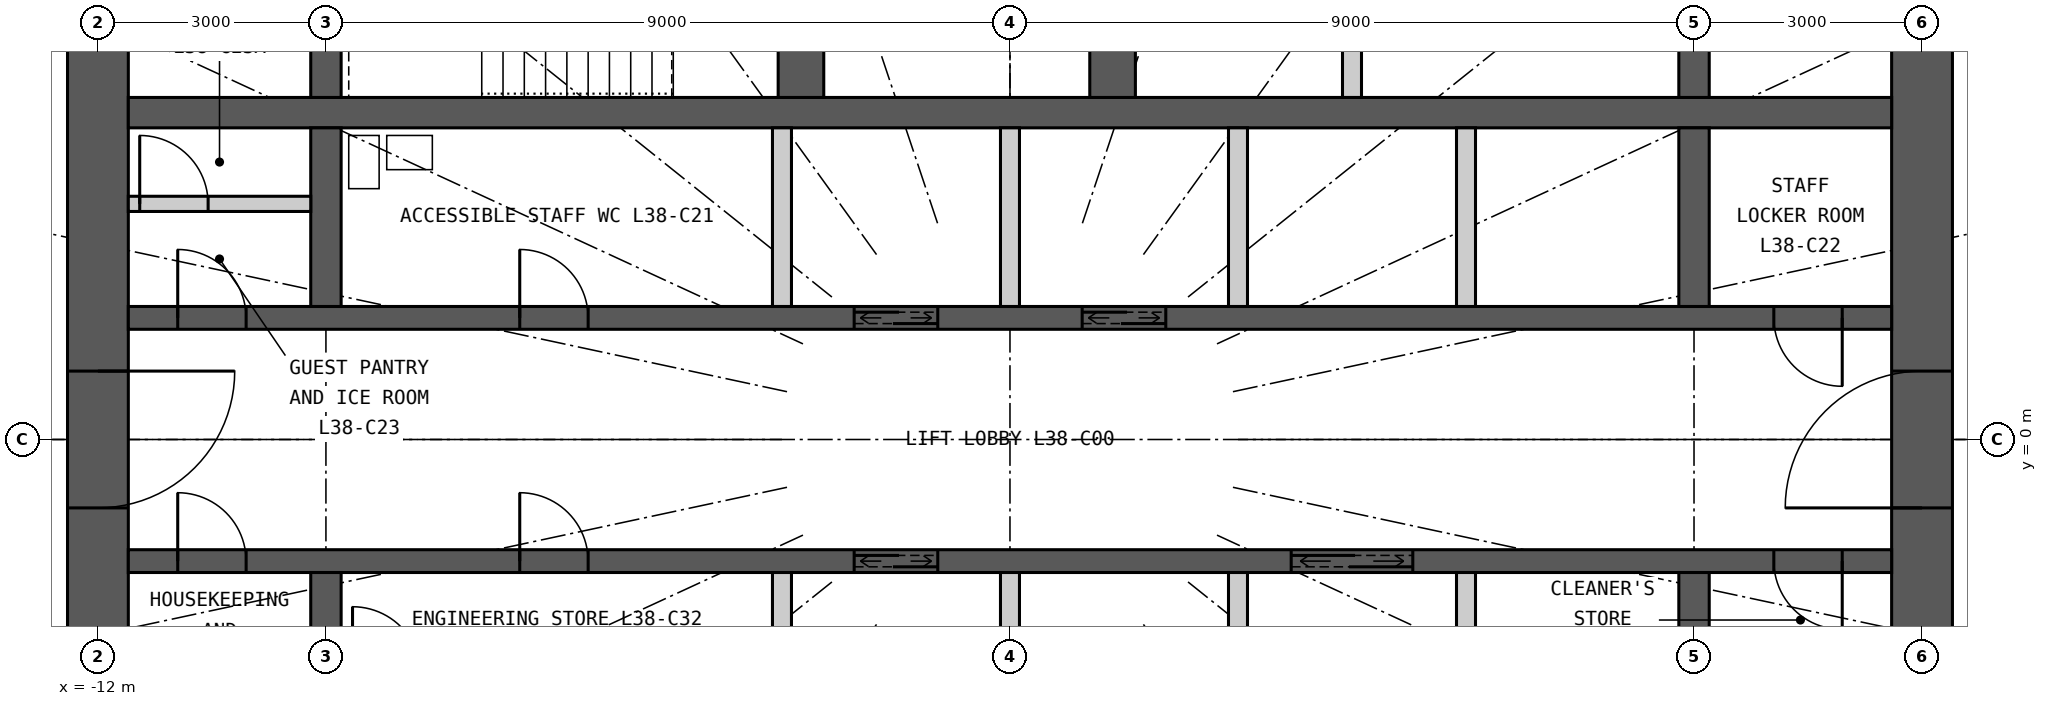
"""IFC4 building model, lengths in metres.
Left out: names, types, materials, properties, quantities, classifications, styles, units other than length and angle.
Written with IfcOpenShell. Run it as: python <this file> out.ifc"""

import sys

from ifc_helpers import new_model, si_unit, direction, frame, frame_2d, origin, place, context, subcontext, project, spatial, rectangle, extrude, element, fill, save


model = new_model("IFC4")
c1 = context("Model", 3, precision=1e-05, world=origin(), true_north=direction((0.0, 1.0)))
c2 = subcontext(c1, "Body", "Model", "MODEL_VIEW")
j1 = project(units=[si_unit("LENGTHUNIT", "METRE"), si_unit("PLANEANGLEUNIT", "RADIAN")], contexts=[c1])
p1 = place(None, origin())
s1 = spatial("IfcSite", under=j1, at=p1, CompositionType="ELEMENT")
p2 = place(p1, origin())
s2 = spatial("IfcBuilding", under=s1, at=p2, CompositionType="ELEMENT")
p3 = place(p2, frame((0.0, 0.0, 146.7)))
s3 = spatial("IfcBuildingStorey", under=s2, at=p3, CompositionType="ELEMENT", Elevation=146.7)
p4 = place(p3, frame((12.0, -7.6, 0.0), z_axis=(0.0, 0.0, 1.0), x_axis=(0.0, 1.0, 0.0)))
e1 = element("IfcWall", 1, at=p4, inside=s3, PredefinedType="SHEAR", context=c2, shape_type="SweptSolid", body=[
    extrude(rectangle(XDim=15.2, YDim=0.8, at=frame_2d((7.6, 0.0))), origin(), (0.0, 0.0, 1.0), 3.3),
])
p5 = place(p4, frame((6.7, 0.0, 0.0)))
e2 = element("IfcOpeningElement", 2, at=p5, cuts=e1, PredefinedType="OPENING", context=c2, shape_type="SweptSolid", body=[
    extrude(rectangle(XDim=1.8, YDim=2.2, at=frame_2d((0.9, 1.1))), frame((0.0, 0.41, 0.0), z_axis=(0.0, -1.0, 0.0), x_axis=(1.0, 0.0, 0.0)), (0.0, 0.0, 1.0), 0.82),
])
p6 = place(p3, frame((-12.0, 7.6, 0.0), z_axis=(0.0, 0.0, 1.0), x_axis=(0.0, -1.0, 0.0)))
e3 = element("IfcWall", 3, at=p6, inside=s3, PredefinedType="SHEAR", context=c2, shape_type="SweptSolid", body=[
    extrude(rectangle(XDim=15.2, YDim=0.8, at=frame_2d((7.6, 0.0))), origin(), (0.0, 0.0, 1.0), 3.3),
])
p7 = place(p6, frame((6.7, 0.0, 0.0)))
e4 = element("IfcOpeningElement", 4, at=p7, cuts=e3, PredefinedType="OPENING", context=c2, shape_type="SweptSolid", body=[
    extrude(rectangle(XDim=1.8, YDim=2.2, at=frame_2d((0.9, 1.1))), frame((0.0, 0.41, 0.0), z_axis=(0.0, -1.0, 0.0), x_axis=(1.0, 0.0, 0.0)), (0.0, 0.0, 1.0), 0.82),
])
p8 = place(p3, frame((-11.6, 4.3, 0.0), z_axis=(0.0, 0.0, 1.0), x_axis=(1.0, 0.0, 0.0)))
e5 = element("IfcWall", 5, at=p8, inside=s3, PredefinedType="SHEAR", context=c2, shape_type="SweptSolid", body=[
    extrude(rectangle(XDim=23.2, YDim=0.4, at=frame_2d((11.6, 0.0))), origin(), (0.0, 0.0, 1.0), 3.3),
])
p9 = place(p3, frame((-11.6, 1.6, 0.0), z_axis=(0.0, 0.0, 1.0), x_axis=(1.0, 0.0, 0.0)))
e6 = element("IfcWall", 6, at=p9, inside=s3, PredefinedType="SHEAR", context=c2, shape_type="SweptSolid", body=[
    extrude(rectangle(XDim=23.2, YDim=0.3, at=frame_2d((11.6, 0.0))), origin(), (0.0, 0.0, 1.0), 3.3),
])
p10 = place(p9, frame((9.55, 0.0, 0.0)))
e7 = element("IfcOpeningElement", 7, at=p10, cuts=e6, PredefinedType="OPENING", context=c2, shape_type="SweptSolid", body=[
    extrude(rectangle(XDim=1.1, YDim=2.2, at=frame_2d((0.55, 1.1))), frame((0.0, 0.16, 0.0), z_axis=(0.0, -1.0, 0.0), x_axis=(1.0, 0.0, 0.0)), (0.0, 0.0, 1.0), 0.32),
])
p11 = place(p9, frame((12.55, 0.0, 0.0)))
e8 = element("IfcOpeningElement", 8, at=p11, cuts=e6, PredefinedType="OPENING", context=c2, shape_type="SweptSolid", body=[
    extrude(rectangle(XDim=1.1, YDim=2.2, at=frame_2d((0.55, 1.1))), frame((0.0, 0.16, 0.0), z_axis=(0.0, -1.0, 0.0), x_axis=(1.0, 0.0, 0.0)), (0.0, 0.0, 1.0), 0.32),
])
p12 = place(p9, frame((5.15, 0.0, 0.0)))
e9 = element("IfcOpeningElement", 9, at=p12, cuts=e6, PredefinedType="OPENING", context=c2, shape_type="SweptSolid", body=[
    extrude(rectangle(XDim=0.9, YDim=2.2, at=frame_2d((0.45, 1.1))), frame((0.0, 0.16, 0.0), z_axis=(0.0, -1.0, 0.0), x_axis=(1.0, 0.0, 0.0)), (0.0, 0.0, 1.0), 0.32),
])
p13 = place(p9, frame((21.65, 0.0, 0.0)))
e10 = element("IfcOpeningElement", 10, at=p13, cuts=e6, PredefinedType="OPENING", context=c2, shape_type="SweptSolid", body=[
    extrude(rectangle(XDim=0.9, YDim=2.2, at=frame_2d((0.45, 1.1))), frame((0.0, 0.16, 0.0), z_axis=(0.0, -1.0, 0.0), x_axis=(1.0, 0.0, 0.0)), (0.0, 0.0, 1.0), 0.32),
])
p14 = place(p9, frame((0.65, 0.0, 0.0)))
e11 = element("IfcOpeningElement", 11, at=p14, cuts=e6, PredefinedType="OPENING", context=c2, shape_type="SweptSolid", body=[
    extrude(rectangle(XDim=0.9, YDim=2.2, at=frame_2d((0.45, 1.1))), frame((0.0, 0.16, 0.0), z_axis=(0.0, -1.0, 0.0), x_axis=(1.0, 0.0, 0.0)), (0.0, 0.0, 1.0), 0.32),
])
p15 = place(p3, frame((-11.6, -1.6, 0.0), z_axis=(0.0, 0.0, 1.0), x_axis=(1.0, 0.0, 0.0)))
e12 = element("IfcWall", 12, at=p15, inside=s3, PredefinedType="SHEAR", context=c2, shape_type="SweptSolid", body=[
    extrude(rectangle(XDim=23.2, YDim=0.3, at=frame_2d((11.6, 0.0))), origin(), (0.0, 0.0, 1.0), 3.3),
])
p16 = place(p15, frame((9.55, 0.0, 0.0)))
e13 = element("IfcOpeningElement", 13, at=p16, cuts=e12, PredefinedType="OPENING", context=c2, shape_type="SweptSolid", body=[
    extrude(rectangle(XDim=1.1, YDim=2.2, at=frame_2d((0.55, 1.1))), frame((0.0, 0.16, 0.0), z_axis=(0.0, -1.0, 0.0), x_axis=(1.0, 0.0, 0.0)), (0.0, 0.0, 1.0), 0.32),
])
p17 = place(p15, frame((15.3, 0.0, 0.0)))
e14 = element("IfcOpeningElement", 14, at=p17, cuts=e12, PredefinedType="OPENING", context=c2, shape_type="SweptSolid", body=[
    extrude(rectangle(XDim=1.6, YDim=2.4, at=frame_2d((0.8, 1.2))), frame((0.0, 0.16, 0.0), z_axis=(0.0, -1.0, 0.0), x_axis=(1.0, 0.0, 0.0)), (0.0, 0.0, 1.0), 0.32),
])
p18 = place(p15, frame((0.65, 0.0, 0.0)))
e15 = element("IfcOpeningElement", 15, at=p18, cuts=e12, PredefinedType="OPENING", context=c2, shape_type="SweptSolid", body=[
    extrude(rectangle(XDim=0.9, YDim=2.2, at=frame_2d((0.45, 1.1))), frame((0.0, 0.16, 0.0), z_axis=(0.0, -1.0, 0.0), x_axis=(1.0, 0.0, 0.0)), (0.0, 0.0, 1.0), 0.32),
])
p19 = place(p15, frame((5.15, 0.0, 0.0)))
e16 = element("IfcOpeningElement", 16, at=p19, cuts=e12, PredefinedType="OPENING", context=c2, shape_type="SweptSolid", body=[
    extrude(rectangle(XDim=0.9, YDim=2.2, at=frame_2d((0.45, 1.1))), frame((0.0, 0.16, 0.0), z_axis=(0.0, -1.0, 0.0), x_axis=(1.0, 0.0, 0.0)), (0.0, 0.0, 1.0), 0.32),
])
p20 = place(p15, frame((21.65, 0.0, 0.0)))
e17 = element("IfcOpeningElement", 17, at=p20, cuts=e12, PredefinedType="OPENING", context=c2, shape_type="SweptSolid", body=[
    extrude(rectangle(XDim=0.9, YDim=2.2, at=frame_2d((0.45, 1.1))), frame((0.0, 0.16, 0.0), z_axis=(0.0, -1.0, 0.0), x_axis=(1.0, 0.0, 0.0)), (0.0, 0.0, 1.0), 0.32),
])
p21 = place(p3, frame((-9.0, 4.5, 0.0), z_axis=(0.0, 0.0, 1.0), x_axis=(0.0, 1.0, 0.0)))
e18 = element("IfcWall", 18, at=p21, inside=s3, PredefinedType="SHEAR", context=c2, shape_type="SweptSolid", body=[
    extrude(rectangle(XDim=3.1, YDim=0.4, at=frame_2d((1.55, 0.0))), origin(), (0.0, 0.0, 1.0), 3.3),
])
for number, where, z_axis, x_axis in (
    (19, (-9.0, 1.75, 0.0), (0.0, 0.0, 1.0), (0.0, 1.0, 0.0)),
    (20, (-9.0, -4.1, 0.0), (0.0, 0.0, 1.0), (0.0, 1.0, 0.0)),
):
    element("IfcWall", number, at=place(p3, frame(where, z_axis=z_axis, x_axis=x_axis)), inside=s3, PredefinedType="SHEAR", context=c2, shape_type="SweptSolid", body=[
        extrude(rectangle(XDim=2.35, YDim=0.4, at=frame_2d((1.175, 0.0))), origin(), (0.0, 0.0, 1.0), 3.3),
    ])
p22 = place(p3, frame((9.0, 4.5, 0.0), z_axis=(0.0, 0.0, 1.0), x_axis=(0.0, 1.0, 0.0)))
e21 = element("IfcWall", 21, at=p22, inside=s3, PredefinedType="SHEAR", context=c2, shape_type="SweptSolid", body=[
    extrude(rectangle(XDim=3.1, YDim=0.4, at=frame_2d((1.55, 0.0))), origin(), (0.0, 0.0, 1.0), 3.3),
])
for number, where, z_axis, x_axis in (
    (22, (9.0, 1.75, 0.0), (0.0, 0.0, 1.0), (0.0, 1.0, 0.0)),
    (23, (9.0, -4.1, 0.0), (0.0, 0.0, 1.0), (0.0, 1.0, 0.0)),
):
    element("IfcWall", number, at=place(p3, frame(where, z_axis=z_axis, x_axis=x_axis)), inside=s3, PredefinedType="SHEAR", context=c2, shape_type="SweptSolid", body=[
        extrude(rectangle(XDim=2.35, YDim=0.4, at=frame_2d((1.175, 0.0))), origin(), (0.0, 0.0, 1.0), 3.3),
    ])
p23 = place(p3, frame((-2.75, 4.5, 0.0), z_axis=(0.0, 0.0, 1.0), x_axis=(0.0, 1.0, 0.0)))
e24 = element("IfcWall", 24, at=p23, inside=s3, PredefinedType="SHEAR", context=c2, shape_type="SweptSolid", body=[
    extrude(rectangle(XDim=3.1, YDim=0.6, at=frame_2d((1.55, 0.0))), origin(), (0.0, 0.0, 1.0), 3.3),
])
p24 = place(p23, frame((0.925, 0.0, 0.0)))
e25 = element("IfcOpeningElement", 25, at=p24, cuts=e24, PredefinedType="OPENING", context=c2, shape_type="SweptSolid", body=[
    extrude(rectangle(XDim=1.1, YDim=2.2, at=frame_2d((0.55, 1.1))), frame((0.0, 0.31, 0.0), z_axis=(0.0, -1.0, 0.0), x_axis=(1.0, 0.0, 0.0)), (0.0, 0.0, 1.0), 0.62),
])
p25 = place(p3, frame((1.35, 4.5, 0.0), z_axis=(0.0, 0.0, 1.0), x_axis=(0.0, 1.0, 0.0)))
e26 = element("IfcWall", 26, at=p25, inside=s3, PredefinedType="SHEAR", context=c2, shape_type="SweptSolid", body=[
    extrude(rectangle(XDim=3.1, YDim=0.6, at=frame_2d((1.55, 0.0))), origin(), (0.0, 0.0, 1.0), 3.3),
])
p26 = place(p25, frame((1.0, 0.0, 0.0)))
e27 = element("IfcOpeningElement", 27, at=p26, cuts=e26, PredefinedType="OPENING", context=c2, shape_type="SweptSolid", body=[
    extrude(rectangle(XDim=1.1, YDim=2.2, at=frame_2d((0.55, 1.1))), frame((0.0, 0.31, 0.0), z_axis=(0.0, -1.0, 0.0), x_axis=(1.0, 0.0, 0.0)), (0.0, 0.0, 1.0), 0.62),
])
p27 = place(p3, frame((4.5, 4.5, 0.0), z_axis=(0.0, 0.0, 1.0), x_axis=(0.0, 1.0, 0.0)))
e28 = element("IfcWall", 28, at=p27, inside=s3, PredefinedType="PARTITIONING", context=c2, shape_type="SweptSolid", body=[
    extrude(rectangle(XDim=3.1, YDim=0.25, at=frame_2d((1.55, 0.0))), origin(), (0.0, 0.0, 1.0), 3.3),
])
for number, where, z_axis, x_axis in (
    (29, (-3.0, 1.75, 0.0), (0.0, 0.0, 1.0), (0.0, 1.0, 0.0)),
    (30, (0.0, 1.75, 0.0), (0.0, 0.0, 1.0), (0.0, 1.0, 0.0)),
    (31, (3.0, 1.75, 0.0), (0.0, 0.0, 1.0), (0.0, 1.0, 0.0)),
    (32, (6.0, 1.75, 0.0), (0.0, 0.0, 1.0), (0.0, 1.0, 0.0)),
    (33, (-3.0, -4.1, 0.0), (0.0, 0.0, 1.0), (0.0, 1.0, 0.0)),
    (34, (0.0, -4.1, 0.0), (0.0, 0.0, 1.0), (0.0, 1.0, 0.0)),
    (35, (3.0, -4.1, 0.0), (0.0, 0.0, 1.0), (0.0, 1.0, 0.0)),
    (36, (6.0, -4.1, 0.0), (0.0, 0.0, 1.0), (0.0, 1.0, 0.0)),
):
    element("IfcWall", number, at=place(p3, frame(where, z_axis=z_axis, x_axis=x_axis)), inside=s3, PredefinedType="PARTITIONING", context=c2, shape_type="SweptSolid", body=[
        extrude(rectangle(XDim=2.35, YDim=0.25, at=frame_2d((1.175, 0.0))), origin(), (0.0, 0.0, 1.0), 3.3),
    ])
p28 = place(p3, frame((-11.6, 3.1, 0.0), z_axis=(0.0, 0.0, 1.0), x_axis=(1.0, 0.0, 0.0)))
e37 = element("IfcWall", 37, at=p28, inside=s3, PredefinedType="PARTITIONING", context=c2, shape_type="SweptSolid", body=[
    extrude(rectangle(XDim=2.4, YDim=0.2, at=frame_2d((1.2, 0.0))), origin(), (0.0, 0.0, 1.0), 3.12),
])
p29 = place(p28, frame((0.15, 0.0, 0.0)))
e38 = element("IfcOpeningElement", 38, at=p29, cuts=e37, PredefinedType="OPENING", context=c2, shape_type="SweptSolid", body=[
    extrude(rectangle(XDim=0.9, YDim=2.2, at=frame_2d((0.45, 1.1))), frame((0.0, 0.11, 0.0), z_axis=(0.0, -1.0, 0.0), x_axis=(1.0, 0.0, 0.0)), (0.0, 0.0, 1.0), 0.22),
])
p30 = place(p10, origin())
e39 = element("IfcDoor", 39, at=p30, inside=s3, OperationType="DOUBLE_DOOR_SLIDING", PredefinedType="DOOR", context=c2, shape_type="SweptSolid", body=[
    extrude(rectangle(XDim=1.1, YDim=2.2, at=frame_2d((0.55, 1.1))), frame((0.0, 0.025, 0.0), z_axis=(0.0, -1.0, 0.0), x_axis=(1.0, 0.0, 0.0)), (0.0, 0.0, 1.0), 0.05),
])
fill(e7, e39)
p31 = place(p11, origin())
e40 = element("IfcDoor", 40, at=p31, inside=s3, OperationType="DOUBLE_DOOR_SLIDING", PredefinedType="DOOR", context=c2, shape_type="SweptSolid", body=[
    extrude(rectangle(XDim=1.1, YDim=2.2, at=frame_2d((0.55, 1.1))), frame((0.0, 0.025, 0.0), z_axis=(0.0, -1.0, 0.0), x_axis=(1.0, 0.0, 0.0)), (0.0, 0.0, 1.0), 0.05),
])
fill(e8, e40)
p32 = place(p16, origin())
e41 = element("IfcDoor", 41, at=p32, inside=s3, OperationType="DOUBLE_DOOR_SLIDING", PredefinedType="DOOR", context=c2, shape_type="SweptSolid", body=[
    extrude(rectangle(XDim=1.1, YDim=2.2, at=frame_2d((0.55, 1.1))), frame((0.0, 0.025, 0.0), z_axis=(0.0, -1.0, 0.0), x_axis=(1.0, 0.0, 0.0)), (0.0, 0.0, 1.0), 0.05),
])
fill(e13, e41)
p33 = place(p17, origin())
e42 = element("IfcDoor", 42, at=p33, inside=s3, OperationType="DOUBLE_DOOR_SLIDING", PredefinedType="DOOR", context=c2, shape_type="SweptSolid", body=[
    extrude(rectangle(XDim=1.6, YDim=2.4, at=frame_2d((0.8, 1.2))), frame((0.0, 0.025, 0.0), z_axis=(0.0, -1.0, 0.0), x_axis=(1.0, 0.0, 0.0)), (0.0, 0.0, 1.0), 0.05),
])
fill(e14, e42)
p34 = place(p12, origin())
e43 = element("IfcDoor", 43, at=p34, inside=s3, OperationType="SINGLE_SWING_LEFT", PredefinedType="DOOR", context=c2, shape_type="SweptSolid", body=[
    extrude(rectangle(XDim=0.9, YDim=2.2, at=frame_2d((0.45, 1.1))), frame((0.0, 0.025, 0.0), z_axis=(0.0, -1.0, 0.0), x_axis=(1.0, 0.0, 0.0)), (0.0, 0.0, 1.0), 0.05),
])
fill(e9, e43)
p35 = place(p13, origin())
e44 = element("IfcDoor", 44, at=p35, inside=s3, OperationType="SINGLE_SWING_RIGHT", PredefinedType="DOOR", context=c2, shape_type="SweptSolid", body=[
    extrude(rectangle(XDim=0.9, YDim=2.2, at=frame_2d((0.45, 1.1))), frame((0.0, 0.025, 0.0), z_axis=(0.0, -1.0, 0.0), x_axis=(1.0, 0.0, 0.0)), (0.0, 0.0, 1.0), 0.05),
])
fill(e10, e44)
p36 = place(p18, origin())
e45 = element("IfcDoor", 45, at=p36, inside=s3, OperationType="SINGLE_SWING_LEFT", PredefinedType="DOOR", context=c2, shape_type="SweptSolid", body=[
    extrude(rectangle(XDim=0.9, YDim=2.2, at=frame_2d((0.45, 1.1))), frame((0.0, 0.025, 0.0), z_axis=(0.0, -1.0, 0.0), x_axis=(1.0, 0.0, 0.0)), (0.0, 0.0, 1.0), 0.05),
])
fill(e15, e45)
p37 = place(p19, origin())
e46 = element("IfcDoor", 46, at=p37, inside=s3, OperationType="SINGLE_SWING_LEFT", PredefinedType="DOOR", context=c2, shape_type="SweptSolid", body=[
    extrude(rectangle(XDim=0.9, YDim=2.2, at=frame_2d((0.45, 1.1))), frame((0.0, 0.025, 0.0), z_axis=(0.0, -1.0, 0.0), x_axis=(1.0, 0.0, 0.0)), (0.0, 0.0, 1.0), 0.05),
])
fill(e16, e46)
p38 = place(p20, origin())
e47 = element("IfcDoor", 47, at=p38, inside=s3, OperationType="SINGLE_SWING_RIGHT", PredefinedType="DOOR", context=c2, shape_type="SweptSolid", body=[
    extrude(rectangle(XDim=0.9, YDim=2.2, at=frame_2d((0.45, 1.1))), frame((0.0, 0.025, 0.0), z_axis=(0.0, -1.0, 0.0), x_axis=(1.0, 0.0, 0.0)), (0.0, 0.0, 1.0), 0.05),
])
fill(e17, e47)
p39 = place(p14, origin())
e48 = element("IfcDoor", 48, at=p39, inside=s3, OperationType="SINGLE_SWING_LEFT", PredefinedType="DOOR", context=c2, shape_type="SweptSolid", body=[
    extrude(rectangle(XDim=0.9, YDim=2.2, at=frame_2d((0.45, 1.1))), frame((0.0, 0.025, 0.0), z_axis=(0.0, -1.0, 0.0), x_axis=(1.0, 0.0, 0.0)), (0.0, 0.0, 1.0), 0.05),
])
fill(e11, e48)
p40 = place(p29, origin())
e49 = element("IfcDoor", 49, at=p40, inside=s3, OperationType="SINGLE_SWING_LEFT", PredefinedType="DOOR", context=c2, shape_type="SweptSolid", body=[
    extrude(rectangle(XDim=0.9, YDim=2.2, at=frame_2d((0.45, 1.1))), frame((0.0, 0.025, 0.0), z_axis=(0.0, -1.0, 0.0), x_axis=(1.0, 0.0, 0.0)), (0.0, 0.0, 1.0), 0.05),
])
fill(e38, e49)
p41 = place(p5, origin())
e50 = element("IfcDoor", 50, at=p41, inside=s3, OperationType="DOUBLE_DOOR_DOUBLE_SWING", PredefinedType="DOOR", context=c2, shape_type="SweptSolid", body=[
    extrude(rectangle(XDim=1.8, YDim=2.2, at=frame_2d((0.9, 1.1))), frame((0.0, 0.025, 0.0), z_axis=(0.0, -1.0, 0.0), x_axis=(1.0, 0.0, 0.0)), (0.0, 0.0, 1.0), 0.05),
])
fill(e2, e50)
p42 = place(p7, origin())
e51 = element("IfcDoor", 51, at=p42, inside=s3, OperationType="DOUBLE_DOOR_DOUBLE_SWING", PredefinedType="DOOR", context=c2, shape_type="SweptSolid", body=[
    extrude(rectangle(XDim=1.8, YDim=2.2, at=frame_2d((0.9, 1.1))), frame((0.0, 0.025, 0.0), z_axis=(0.0, -1.0, 0.0), x_axis=(1.0, 0.0, 0.0)), (0.0, 0.0, 1.0), 0.05),
])
fill(e4, e51)
save(model, sys.argv[1])
